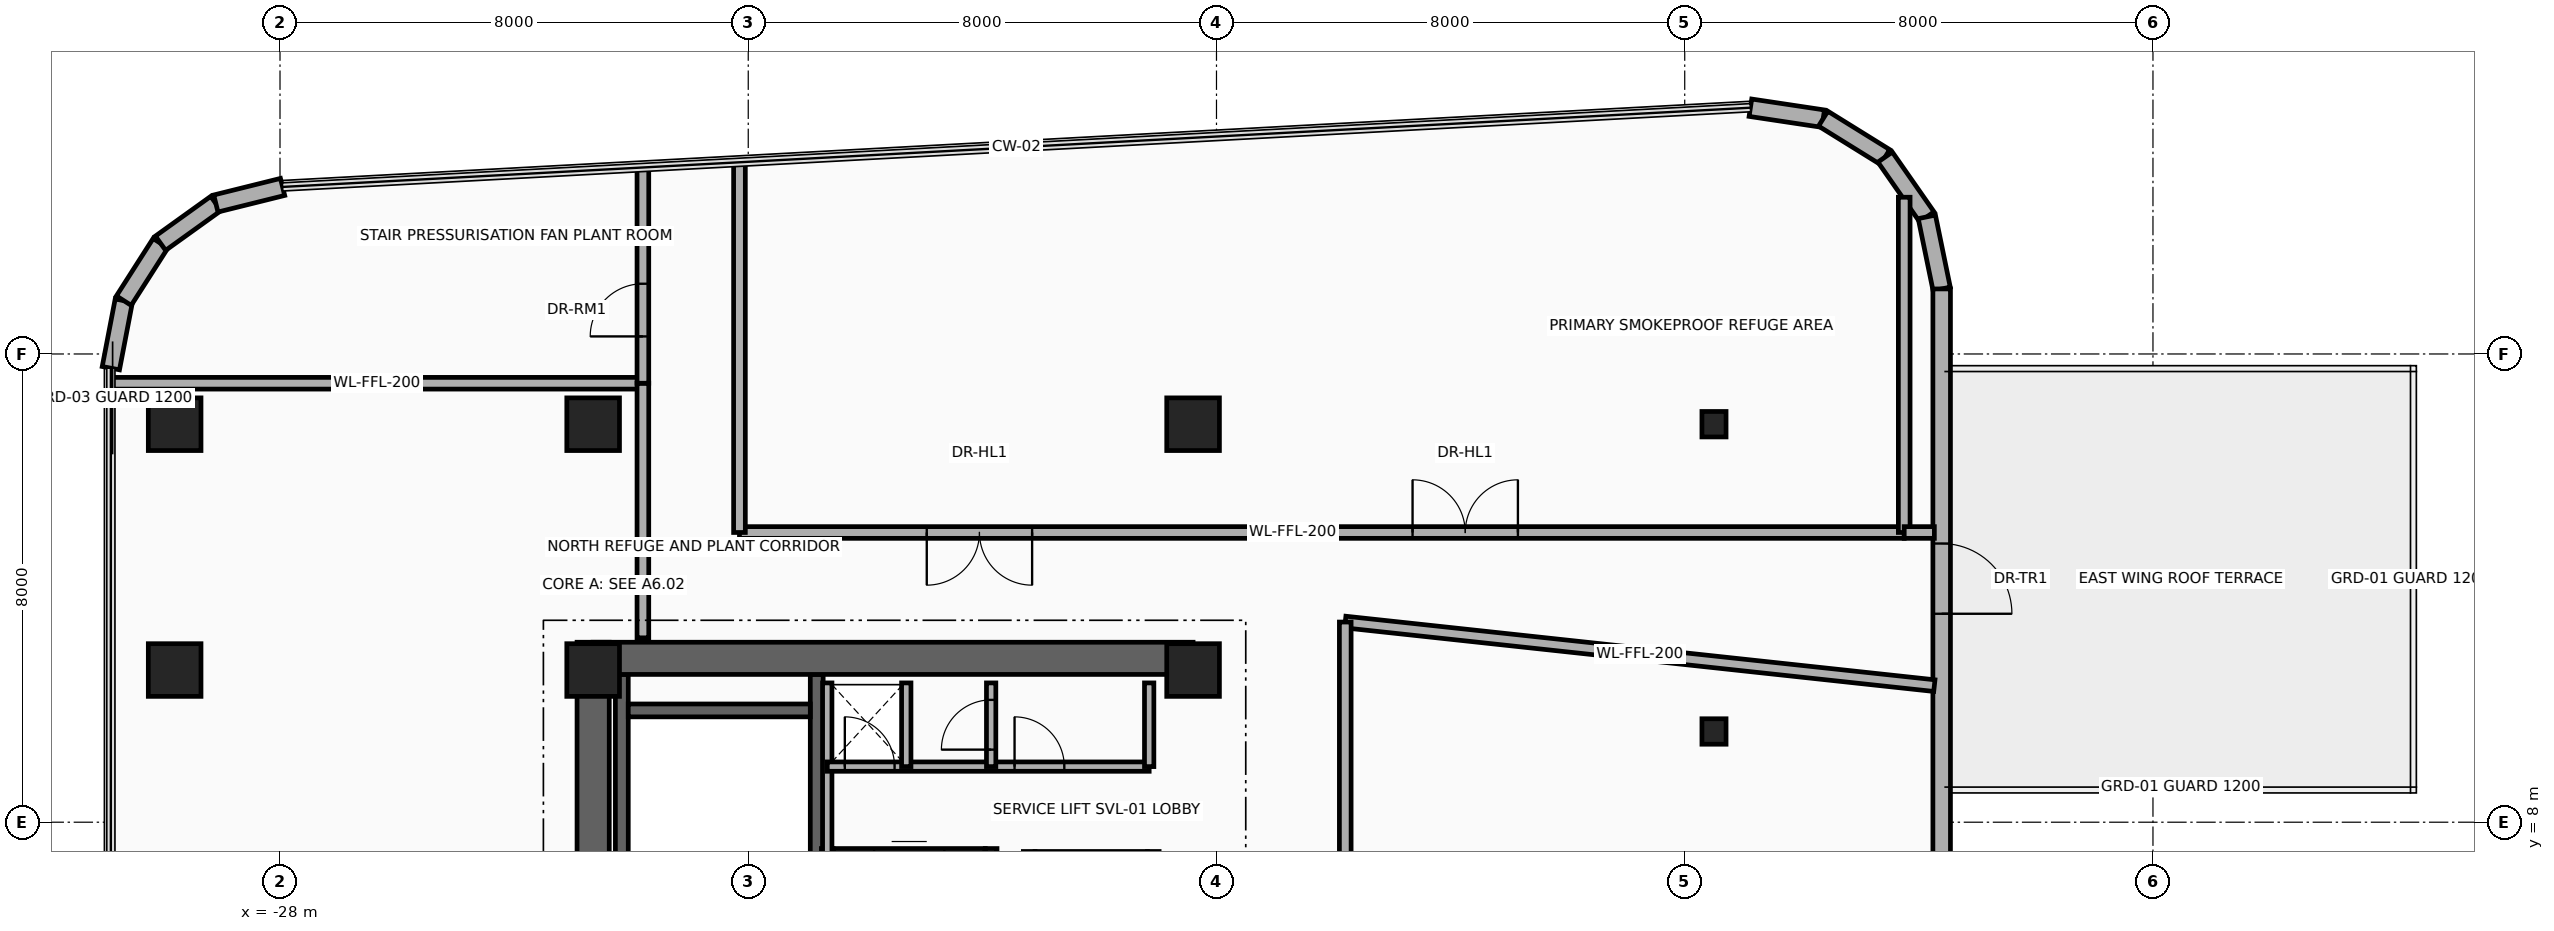
"""IFC4 building model, lengths in metres.
Left out: names, types, materials, properties, quantities, classifications, styles, units other than length and angle.
Written with IfcOpenShell. Run it as: python <this file> out.ifc"""

import sys

from ifc_helpers import new_model, si_unit, direction, frame, frame_2d, origin, origin_2d, place, context, subcontext, project, spatial, rectangle, i_section, extrude, source, transform, mapped, element, fill, save


model = new_model("IFC4")
c1 = context("Model", 3, precision=1e-05, world=origin(), true_north=direction((0.0, 1.0)))
c2 = subcontext(c1, "Body", "Model", "MODEL_VIEW")
j1 = project(units=[si_unit("LENGTHUNIT", "METRE"), si_unit("PLANEANGLEUNIT", "RADIAN")], contexts=[c1])
p1 = place(None, origin())
s1 = spatial("IfcSite", under=j1, at=p1, CompositionType="ELEMENT")
p2 = place(p1, origin())
s2 = spatial("IfcBuilding", under=s1, at=p2, CompositionType="ELEMENT")
p3 = place(p2, frame((0.0, 0.0, 196.3)))
s3 = spatial("IfcBuildingStorey", under=s2, at=p3, CompositionType="ELEMENT", Elevation=196.3)
for number, where, z_axis, x_axis in (
    (1, (-22.16, 1.78, 0.0), (0.0, 0.0, 1.0), (0.0, 1.0, 0.0)),
    (2, (-18.83, 1.78, 0.0), (0.0, 0.0, 1.0), (0.0, 1.0, 0.0)),
):
    element("IfcWall", number, at=place(p3, frame(where, z_axis=z_axis, x_axis=x_axis)), inside=s3, PredefinedType="SHEAR", context=c2, shape_type="SweptSolid", body=[
        extrude(rectangle(XDim=8.745, YDim=0.22, at=frame_2d((4.373, 0.0))), origin(), (0.0, 0.0, 1.0), 4.46),
    ])
p4 = place(p3, frame((-22.05, 9.91, 0.0), z_axis=(0.0, 0.0, 1.0), x_axis=(1.0, 0.0, 0.0)))
e3 = element("IfcWall", 3, at=p4, inside=s3, PredefinedType="SHEAR", context=c2, shape_type="SweptSolid", body=[
    extrude(rectangle(XDim=3.11, YDim=0.22, at=frame_2d((1.555, 0.0))), origin(), (0.0, 0.0, 1.0), 4.46),
])
p5 = place(p3, frame((-22.65, -11.075, 0.0), z_axis=(0.0, 0.0, 1.0), x_axis=(0.0, 1.0, 0.0)))
e4 = element("IfcWall", 4, at=p5, inside=s3, PredefinedType="SHEAR", context=c2, shape_type="SweptSolid", body=[
    extrude(rectangle(XDim=22.15, YDim=0.55, at=frame_2d((11.075, 0.0))), origin(), (0.0, 0.0, 1.0), 4.46),
])
p6 = place(p3, frame((-22.65, 10.8, 0.0), z_axis=(0.0, 0.0, 1.0), x_axis=(1.0, 0.0, 0.0)))
e5 = element("IfcWall", 5, at=p6, inside=s3, PredefinedType="SHEAR", context=c2, shape_type="SweptSolid", body=[
    extrude(rectangle(XDim=10.25, YDim=0.55, at=frame_2d((5.125, 0.0))), origin(), (0.0, 0.0, 1.0), 4.46),
])
m1 = source(origin(), c2, "Body", "SweptSolid", [
    extrude(rectangle(XDim=0.9, YDim=0.9, at=origin_2d()), origin(), (0.0, 0.0, 1.0), 4.7),
])
for number, where, z_axis, x_axis in (
    (6, (-29.8, 10.6, 0.0), (0.0, 0.0, 1.0), (1.0, 0.0, 0.0)),
    (7, (-22.65, 10.6, 0.0), (0.0, 0.0, 1.0), (1.0, 0.0, 0.0)),
    (8, (-12.4, 10.6, 0.0), (0.0, 0.0, 1.0), (1.0, 0.0, 0.0)),
    (9, (-29.8, 14.8, 0.0), (0.0, 0.0, 1.0), (1.0, 0.0, 0.0)),
    (10, (-22.65, 14.8, 0.0), (0.0, 0.0, 1.0), (1.0, 0.0, 0.0)),
    (11, (-12.4, 14.8, 0.0), (0.0, 0.0, 1.0), (1.0, 0.0, 0.0)),
):
    element("IfcColumn", number, at=place(p3, frame(where, z_axis=z_axis, x_axis=x_axis)), inside=s3, PredefinedType="COLUMN", context=c2, shape_type="MappedRepresentation", body=[
        mapped(m1, transform((0.0, 0.0, 0.0), x_axis=(1.0, 0.0, 0.0), y_axis=(0.0, 1.0, 0.0), z_axis=(0.0, 0.0, 1.0), scale=1.0)),
    ])
m2 = source(origin(), c2, "Body", "SweptSolid", [
    extrude(i_section(OverallWidth=0.412, OverallDepth=0.435, WebThickness=0.036, FlangeThickness=0.057, at=origin_2d()), origin(), (0.0, 0.0, 1.0), 4.7),
])
for number, where, z_axis, x_axis in (
    (12, (-3.5, 9.55, 0.0), (0.0, 0.0, 1.0), (1.0, 0.0, 0.0)),
    (13, (-3.5, 14.8, 0.0), (0.0, 0.0, 1.0), (1.0, 0.0, 0.0)),
):
    element("IfcColumn", number, at=place(p3, frame(where, z_axis=z_axis, x_axis=x_axis)), inside=s3, PredefinedType="COLUMN", context=c2, shape_type="MappedRepresentation", body=[
        mapped(m2, transform((0.0, 0.0, 0.0), x_axis=(1.0, 0.0, 0.0), y_axis=(0.0, 1.0, 0.0), z_axis=(0.0, 0.0, 1.0), scale=1.0)),
    ])
p7 = place(p3, frame((-30.89, 15.758, 0.0), z_axis=(0.0, 0.0, 1.0), x_axis=(0.18831542659, 0.982108598938, 0.0)))
e14 = element("IfcWall", 14, at=p7, inside=s3, PredefinedType="SOLIDWALL", context=c2, shape_type="SweptSolid", body=[
    extrude(rectangle(XDim=1.175, YDim=0.3, at=frame_2d((0.587, 0.0))), origin(), (0.0, 0.0, 1.0), 4.46),
])
p8 = place(p3, frame((-30.669, 16.911, 0.0), z_axis=(0.0, 0.0, 1.0), x_axis=(0.538678781902, 0.84251122837, 0.0)))
e15 = element("IfcWall", 15, at=p8, inside=s3, PredefinedType="SOLIDWALL", context=c2, shape_type="SweptSolid", body=[
    extrude(rectangle(XDim=1.164, YDim=0.3, at=frame_2d((0.582, 0.0))), origin(), (0.0, 0.0, 1.0), 4.46),
])
p9 = place(p3, frame((-30.042, 17.892, 0.0), z_axis=(0.0, 0.0, 1.0), x_axis=(0.812313539683, 0.583220981487, 0.0)))
e16 = element("IfcWall", 16, at=p9, inside=s3, PredefinedType="SOLIDWALL", context=c2, shape_type="SweptSolid", body=[
    extrude(rectangle(XDim=1.164, YDim=0.3, at=frame_2d((0.582, 0.0))), origin(), (0.0, 0.0, 1.0), 4.46),
])
p10 = place(p3, frame((-29.096, 18.571, 0.0), z_axis=(0.0, 0.0, 1.0), x_axis=(0.97050812798, 0.241068400098, 0.0)))
e17 = element("IfcWall", 17, at=p10, inside=s3, PredefinedType="SOLIDWALL", context=c2, shape_type="SweptSolid", body=[
    extrude(rectangle(XDim=1.175, YDim=0.3, at=frame_2d((0.587, 0.0))), origin(), (0.0, 0.0, 1.0), 4.46),
])
p11 = place(p3, frame((-2.878, 20.208, 0.0), z_axis=(0.0, 0.0, 1.0), x_axis=(0.988902138571, -0.148568369208, 0.0)))
e18 = element("IfcWall", 18, at=p11, inside=s3, PredefinedType="SOLIDWALL", context=c2, shape_type="SweptSolid", body=[
    extrude(rectangle(XDim=1.257, YDim=0.3, at=frame_2d((0.628, 0.0))), origin(), (0.0, 0.0, 1.0), 4.46),
])
p12 = place(p3, frame((-1.635, 20.021, 0.0), z_axis=(0.0, 0.0, 1.0), x_axis=(0.849646224094, -0.52735310171, 0.0)))
e19 = element("IfcWall", 19, at=p12, inside=s3, PredefinedType="SOLIDWALL", context=c2, shape_type="SweptSolid", body=[
    extrude(rectangle(XDim=1.245, YDim=0.3, at=frame_2d((0.623, 0.0))), origin(), (0.0, 0.0, 1.0), 4.46),
])
p13 = place(p3, frame((-0.576, 19.364, 0.0), z_axis=(0.0, 0.0, 1.0), x_axis=(0.572304219931, -0.820041389107, 0.0)))
e20 = element("IfcWall", 20, at=p13, inside=s3, PredefinedType="SOLIDWALL", context=c2, shape_type="SweptSolid", body=[
    extrude(rectangle(XDim=1.246, YDim=0.3, at=frame_2d((0.623, 0.0))), origin(), (0.0, 0.0, 1.0), 4.46),
])
p14 = place(p3, frame((0.136, 18.343, 0.0), z_axis=(0.0, 0.0, 1.0), x_axis=(0.201603599025, -0.979467196419, 0.0)))
e21 = element("IfcWall", 21, at=p14, inside=s3, PredefinedType="SOLIDWALL", context=c2, shape_type="SweptSolid", body=[
    extrude(rectangle(XDim=1.257, YDim=0.3, at=frame_2d((0.628, 0.0))), origin(), (0.0, 0.0, 1.0), 4.46),
])
p15 = place(p3, frame((0.39, 17.111, 0.0), z_axis=(0.0, 0.0, 1.0), x_axis=(0.0, -1.0, 0.0)))
e22 = element("IfcWall", 22, at=p15, inside=s3, PredefinedType="SOLIDWALL", context=c2, shape_type="SweptSolid", body=[
    extrude(rectangle(XDim=10.401, YDim=0.3, at=frame_2d((5.2, 0.0))), origin(), (0.0, 0.0, 1.0), 4.46),
])
p16 = place(p15, frame((4.35, 0.0, 0.0)))
e23 = element("IfcOpeningElement", 23, at=p16, cuts=e22, PredefinedType="OPENING", context=c2, shape_type="SweptSolid", body=[
    extrude(rectangle(XDim=1.2, YDim=2.15, at=frame_2d((0.6, 1.075))), frame((0.0, 0.165, 0.0), z_axis=(0.0, -1.0, 0.0), x_axis=(1.0, 0.0, 0.0)), (0.0, 0.0, 1.0), 0.33),
])
for number, where, z_axis, x_axis in (
    (24, (-18.65, 4.225, 0.0), (0.0, 0.0, 1.0), (0.0, 1.0, 0.0)),
    (25, (-15.85, 4.225, 0.0), (0.0, 0.0, 1.0), (0.0, 1.0, 0.0)),
):
    element("IfcWall", number, at=place(p3, frame(where, z_axis=z_axis, x_axis=x_axis)), inside=s3, PredefinedType="MOVABLE", context=c2, shape_type="SweptSolid", body=[
        extrude(rectangle(XDim=3.325, YDim=0.2, at=frame_2d((1.663, 0.0))), origin(), (0.0, 0.0, 1.0), 4.46),
    ])
p17 = place(p3, frame((-18.55, 7.45, 0.0), z_axis=(0.0, 0.0, 1.0), x_axis=(1.0, 0.0, 0.0)))
e26 = element("IfcWall", 26, at=p17, inside=s3, PredefinedType="MOVABLE", context=c2, shape_type="SweptSolid", body=[
    extrude(rectangle(XDim=2.6, YDim=0.2, at=frame_2d((1.3, 0.0))), origin(), (0.0, 0.0, 1.0), 4.46),
])
p18 = place(p17, frame((0.7, 0.0, 0.0)))
e27 = element("IfcOpeningElement", 27, at=p18, cuts=e26, PredefinedType="OPENING", context=c2, shape_type="SweptSolid", body=[
    extrude(rectangle(XDim=1.2, YDim=2.1, at=frame_2d((0.6, 1.05))), frame((0.0, 0.115, 0.0), z_axis=(0.0, -1.0, 0.0), x_axis=(1.0, 0.0, 0.0)), (0.0, 0.0, 1.0), 0.23),
])
p19 = place(p3, frame((-18.65, 7.45, 0.0), z_axis=(0.0, 0.0, 1.0), x_axis=(0.0, 1.0, 0.0)))
e28 = element("IfcWall", 28, at=p19, inside=s3, PredefinedType="PARTITIONING", context=c2, shape_type="SweptSolid", body=[
    extrude(rectangle(XDim=2.93, YDim=0.16, at=frame_2d((1.465, 0.0))), origin(), (0.0, 0.0, 1.0), 4.46),
])
p20 = place(p3, frame((-18.65, 8.95, 0.0), z_axis=(0.0, 0.0, 1.0), x_axis=(1.0, 0.0, 0.0)))
e29 = element("IfcWall", 29, at=p20, inside=s3, PredefinedType="PARTITIONING", context=c2, shape_type="SweptSolid", body=[
    extrude(rectangle(XDim=5.5, YDim=0.16, at=frame_2d((2.75, 0.0))), origin(), (0.0, 0.0, 1.0), 4.46),
])
p21 = place(p20, frame((0.3, 0.0, 0.0)))
e30 = element("IfcOpeningElement", 30, at=p21, cuts=e29, PredefinedType="OPENING", context=c2, shape_type="SweptSolid", body=[
    extrude(rectangle(XDim=0.85, YDim=2.05, at=frame_2d((0.425, 1.025))), frame((0.0, 0.095, 0.0), z_axis=(0.0, -1.0, 0.0), x_axis=(1.0, 0.0, 0.0)), (0.0, 0.0, 1.0), 0.19),
])
p22 = place(p20, frame((3.2, 0.0, 0.0)))
e31 = element("IfcOpeningElement", 31, at=p22, cuts=e29, PredefinedType="OPENING", context=c2, shape_type="SweptSolid", body=[
    extrude(rectangle(XDim=0.85, YDim=2.05, at=frame_2d((0.425, 1.025))), frame((0.0, 0.095, 0.0), z_axis=(0.0, -1.0, 0.0), x_axis=(1.0, 0.0, 0.0)), (0.0, 0.0, 1.0), 0.19),
])
for number, where, z_axis, x_axis in (
    (32, (-13.15, 8.95, 0.0), (0.0, 0.0, 1.0), (0.0, 1.0, 0.0)),
    (33, (-17.3, 8.95, 0.0), (0.0, 0.0, 1.0), (0.0, 1.0, 0.0)),
):
    element("IfcWall", number, at=place(p3, frame(where, z_axis=z_axis, x_axis=x_axis)), inside=s3, PredefinedType="PARTITIONING", context=c2, shape_type="SweptSolid", body=[
        extrude(rectangle(XDim=1.43, YDim=0.16, at=frame_2d((0.715, 0.0))), origin(), (0.0, 0.0, 1.0), 4.46),
    ])
p23 = place(p3, frame((-15.85, 8.95, 0.0), z_axis=(0.0, 0.0, 1.0), x_axis=(0.0, 1.0, 0.0)))
e34 = element("IfcWall", 34, at=p23, inside=s3, PredefinedType="PARTITIONING", context=c2, shape_type="SweptSolid", body=[
    extrude(rectangle(XDim=1.43, YDim=0.16, at=frame_2d((0.715, 0.0))), origin(), (0.0, 0.0, 1.0), 4.46),
])
p24 = place(p23, frame((0.29, 0.0, 0.0)))
e35 = element("IfcOpeningElement", 35, at=p24, cuts=e34, PredefinedType="OPENING", context=c2, shape_type="SweptSolid", body=[
    extrude(rectangle(XDim=0.85, YDim=2.05, at=frame_2d((0.425, 1.025))), frame((0.0, 0.095, 0.0), z_axis=(0.0, -1.0, 0.0), x_axis=(1.0, 0.0, 0.0)), (0.0, 0.0, 1.0), 0.19),
])
p25 = place(p3, frame((-30.89, 15.5, 0.0), z_axis=(0.0, 0.0, 1.0), x_axis=(1.0, 0.0, 0.0)))
e36 = element("IfcWall", 36, at=p25, inside=s3, PredefinedType="PARTITIONING", context=c2, shape_type="SweptSolid", body=[
    extrude(rectangle(XDim=9.09, YDim=0.2, at=frame_2d((4.545, 0.0))), origin(), (0.0, 0.0, 1.0), 4.46),
])
p26 = place(p3, frame((-21.8, 11.15, 0.0), z_axis=(0.0, 0.0, 1.0), x_axis=(0.0, 1.0, 0.0)))
e37 = element("IfcWall", 37, at=p26, inside=s3, PredefinedType="PARTITIONING", context=c2, shape_type="SweptSolid", body=[
    extrude(rectangle(XDim=4.35, YDim=0.2, at=frame_2d((2.175, 0.0))), origin(), (0.0, 0.0, 1.0), 3.744),
])
p27 = place(p3, frame((-21.8, 15.5, 0.0), z_axis=(0.0, 0.0, 1.0), x_axis=(0.0, 1.0, 0.0)))
e38 = element("IfcWall", 38, at=p27, inside=s3, PredefinedType="PARTITIONING", context=c2, shape_type="SweptSolid", body=[
    extrude(rectangle(XDim=3.686, YDim=0.2, at=frame_2d((1.843, 0.0))), origin(), (0.0, 0.0, 1.0), 4.46),
])
p28 = place(p27, frame((0.8, 0.0, 0.0)))
e39 = element("IfcOpeningElement", 39, at=p28, cuts=e38, PredefinedType="OPENING", context=c2, shape_type="SweptSolid", body=[
    extrude(rectangle(XDim=0.9, YDim=2.1, at=frame_2d((0.45, 1.05))), frame((0.0, 0.115, 0.0), z_axis=(0.0, -1.0, 0.0), x_axis=(1.0, 0.0, 0.0)), (0.0, 0.0, 1.0), 0.23),
])
p29 = place(p3, frame((-20.15, 12.95, 0.0), z_axis=(0.0, 0.0, 1.0), x_axis=(1.0, 0.0, 0.0)))
e40 = element("IfcWall", 40, at=p29, inside=s3, PredefinedType="PARTITIONING", context=c2, shape_type="SweptSolid", body=[
    extrude(rectangle(XDim=19.9, YDim=0.2, at=frame_2d((9.95, 0.0))), origin(), (0.0, 0.0, 1.0), 3.834),
])
p30 = place(p29, frame((3.2, 0.0, 0.0)))
e41 = element("IfcOpeningElement", 41, at=p30, cuts=e40, PredefinedType="OPENING", context=c2, shape_type="SweptSolid", body=[
    extrude(rectangle(XDim=1.8, YDim=2.15, at=frame_2d((0.9, 1.075))), frame((0.0, 0.115, 0.0), z_axis=(0.0, -1.0, 0.0), x_axis=(1.0, 0.0, 0.0)), (0.0, 0.0, 1.0), 0.23),
])
p31 = place(p29, frame((11.5, 0.0, 0.0)))
e42 = element("IfcOpeningElement", 42, at=p31, cuts=e40, PredefinedType="OPENING", context=c2, shape_type="SweptSolid", body=[
    extrude(rectangle(XDim=1.8, YDim=2.15, at=frame_2d((0.9, 1.075))), frame((0.0, 0.115, 0.0), z_axis=(0.0, -1.0, 0.0), x_axis=(1.0, 0.0, 0.0)), (0.0, 0.0, 1.0), 0.23),
])
p32 = place(p3, frame((-20.15, 12.95, 0.0), z_axis=(0.0, 0.0, 1.0), x_axis=(0.0, 1.0, 0.0)))
e43 = element("IfcWall", 43, at=p32, inside=s3, PredefinedType="PARTITIONING", context=c2, shape_type="SweptSolid", body=[
    extrude(rectangle(XDim=6.325, YDim=0.2, at=frame_2d((3.163, 0.0))), origin(), (0.0, 0.0, 1.0), 3.744),
])
p33 = place(p3, frame((-0.25, 12.95, 0.0), z_axis=(0.0, 0.0, 1.0), x_axis=(0.0, 1.0, 0.0)))
e44 = element("IfcWall", 44, at=p33, inside=s3, PredefinedType="PARTITIONING", context=c2, shape_type="SweptSolid", body=[
    extrude(rectangle(XDim=5.728, YDim=0.2, at=frame_2d((2.864, 0.0))), origin(), (0.0, 0.0, 1.0), 4.46),
])
p34 = place(p3, frame((-9.8, 11.42, 0.0), z_axis=(0.0, 0.0, 1.0), x_axis=(0.994224725298, -0.107318197923, 0.0)))
e45 = element("IfcWall", 45, at=p34, inside=s3, PredefinedType="PARTITIONING", context=c2, shape_type="SweptSolid", body=[
    extrude(rectangle(XDim=10.123, YDim=0.2, at=frame_2d((5.062, 0.0))), origin(), (0.0, 0.0, 1.0), 3.906),
])
p35 = place(p3, frame((-0.25, 12.95, 0.0), z_axis=(0.0, 0.0, 1.0), x_axis=(1.0, 0.0, 0.0)))
e46 = element("IfcWall", 46, at=p35, inside=s3, PredefinedType="PARTITIONING", context=c2, shape_type="SweptSolid", body=[
    extrude(rectangle(XDim=0.515, YDim=0.2, at=frame_2d((0.257, 0.0))), origin(), (0.0, 0.0, 1.0), 4.46),
])
p36 = place(p3, frame((-9.8, -12.9, 0.0), z_axis=(0.0, 0.0, 1.0), x_axis=(0.0, 1.0, 0.0)))
e47 = element("IfcWall", 47, at=p36, inside=s3, PredefinedType="PARTITIONING", context=c2, shape_type="SweptSolid", body=[
    extrude(rectangle(XDim=24.32, YDim=0.2, at=frame_2d((12.16, 0.0))), origin(), (0.0, 0.0, 1.0), 3.744),
])
p37 = place(p16, origin())
e48 = element("IfcDoor", 48, at=p37, inside=s3, OperationType="SINGLE_SWING_LEFT", PredefinedType="DOOR", context=c2, shape_type="SweptSolid", body=[
    extrude(rectangle(XDim=1.2, YDim=2.15, at=frame_2d((0.6, 1.075))), frame((0.0, 0.025, 0.0), z_axis=(0.0, -1.0, 0.0), x_axis=(1.0, 0.0, 0.0)), (0.0, 0.0, 1.0), 0.05),
])
fill(e23, e48)
p38 = place(p21, origin())
e49 = element("IfcDoor", 49, at=p38, inside=s3, OperationType="SINGLE_SWING_LEFT", PredefinedType="DOOR", context=c2, shape_type="SweptSolid", body=[
    extrude(rectangle(XDim=0.85, YDim=2.05, at=frame_2d((0.425, 1.025))), frame((0.0, 0.025, 0.0), z_axis=(0.0, -1.0, 0.0), x_axis=(1.0, 0.0, 0.0)), (0.0, 0.0, 1.0), 0.05),
])
fill(e30, e49)
p39 = place(p22, origin())
e50 = element("IfcDoor", 50, at=p39, inside=s3, OperationType="SINGLE_SWING_RIGHT", PredefinedType="DOOR", context=c2, shape_type="SweptSolid", body=[
    extrude(rectangle(XDim=0.85, YDim=2.05, at=frame_2d((0.425, 1.025))), frame((0.0, 0.025, 0.0), z_axis=(0.0, -1.0, 0.0), x_axis=(1.0, 0.0, 0.0)), (0.0, 0.0, 1.0), 0.05),
])
fill(e31, e50)
p40 = place(p24, origin())
e51 = element("IfcDoor", 51, at=p40, inside=s3, OperationType="SINGLE_SWING_LEFT", PredefinedType="DOOR", context=c2, shape_type="SweptSolid", body=[
    extrude(rectangle(XDim=0.85, YDim=2.05, at=frame_2d((0.425, 1.025))), frame((0.0, 0.025, 0.0), z_axis=(0.0, -1.0, 0.0), x_axis=(1.0, 0.0, 0.0)), (0.0, 0.0, 1.0), 0.05),
])
fill(e35, e51)
p41 = place(p28, origin())
e52 = element("IfcDoor", 52, at=p41, inside=s3, OperationType="SINGLE_SWING_RIGHT", PredefinedType="DOOR", context=c2, shape_type="SweptSolid", body=[
    extrude(rectangle(XDim=0.9, YDim=2.1, at=frame_2d((0.45, 1.05))), frame((0.0, 0.025, 0.0), z_axis=(0.0, -1.0, 0.0), x_axis=(1.0, 0.0, 0.0)), (0.0, 0.0, 1.0), 0.05),
])
fill(e39, e52)
p42 = place(p30, frame((1.8, 0.0, 0.0), z_axis=(0.0, 0.0, 1.0), x_axis=(-1.0, 0.0, 0.0)))
e53 = element("IfcDoor", 53, at=p42, inside=s3, OperationType="DOUBLE_DOOR_SINGLE_SWING", PredefinedType="DOOR", context=c2, shape_type="SweptSolid", body=[
    extrude(rectangle(XDim=1.8, YDim=2.15, at=frame_2d((0.9, 1.075))), frame((0.0, 0.025, 0.0), z_axis=(0.0, -1.0, 0.0), x_axis=(1.0, 0.0, 0.0)), (0.0, 0.0, 1.0), 0.05),
])
fill(e41, e53)
p43 = place(p31, origin())
e54 = element("IfcDoor", 54, at=p43, inside=s3, OperationType="DOUBLE_DOOR_SINGLE_SWING", PredefinedType="DOOR", context=c2, shape_type="SweptSolid", body=[
    extrude(rectangle(XDim=1.8, YDim=2.15, at=frame_2d((0.9, 1.075))), frame((0.0, 0.025, 0.0), z_axis=(0.0, -1.0, 0.0), x_axis=(1.0, 0.0, 0.0)), (0.0, 0.0, 1.0), 0.05),
])
fill(e42, e54)
save(model, sys.argv[1])
